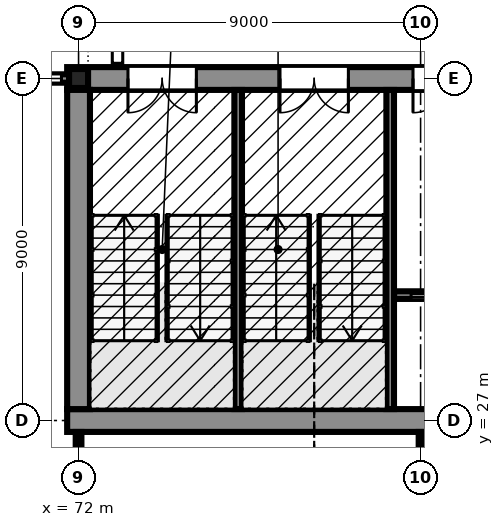
"""IFC4 building model, lengths in metres.
Left out: names, types, materials, properties, quantities, classifications, styles, units other than length and angle.
Written with IfcOpenShell. Run it as: python <this file> out.ifc"""

import sys

from ifc_helpers import new_model, si_unit, direction, frame, frame_2d, origin, origin_2d, place, context, subcontext, project, spatial, polyline, rectangle, hollow_rectangle, outline, extrude, element, fill, save


model = new_model("IFC4")
c1 = context("Model", 3, precision=1e-05, world=origin(), true_north=direction((0.0, 1.0)))
c2 = subcontext(c1, "Body", "Model", "MODEL_VIEW")
j1 = project(units=[si_unit("LENGTHUNIT", "METRE"), si_unit("PLANEANGLEUNIT", "RADIAN")], contexts=[c1])
p1 = place(None, origin())
s1 = spatial("IfcSite", under=j1, at=p1, CompositionType="ELEMENT")
p2 = place(p1, origin())
s2 = spatial("IfcBuilding", under=s1, at=p2, CompositionType="ELEMENT")
p3 = place(p2, frame((0.0, 0.0, 7.5)))
s3 = spatial("IfcBuildingStorey", under=s2, at=p3, CompositionType="ELEMENT", Elevation=7.5)
p4 = place(p3, frame((72.0, 36.0, 0.0), z_axis=(0.0, 0.0, 1.0), x_axis=(1.0, 0.0, 0.0)))
e1 = element("IfcColumn", 1, at=p4, inside=s3, PredefinedType="COLUMN", context=c2, shape_type="SweptSolid", body=[
    extrude(hollow_rectangle(XDim=0.5, YDim=0.5, WallThickness=0.032, at=origin_2d()), origin(), (0.0, 0.0, 1.0), 4.2),
])
p5 = place(p3, frame((71.7, 27.0, 0.0), z_axis=(0.0, 0.0, 1.0), x_axis=(1.0, 0.0, 0.0)))
e2 = element("IfcWall", 2, at=p5, inside=s3, PredefinedType="SOLIDWALL", context=c2, shape_type="SweptSolid", body=[
    extrude(rectangle(XDim=18.6, YDim=0.6, at=frame_2d((9.3, 0.0))), origin(), (0.0, 0.0, 1.0), 4.2),
])
p6 = place(p3, frame((71.7, 36.0, 0.0), z_axis=(0.0, 0.0, 1.0), x_axis=(1.0, 0.0, 0.0)))
e3 = element("IfcWall", 3, at=p6, inside=s3, PredefinedType="SOLIDWALL", context=c2, shape_type="SweptSolid", body=[
    extrude(rectangle(XDim=18.6, YDim=0.6, at=frame_2d((9.3, 0.0))), origin(), (0.0, 0.0, 1.0), 4.2),
])
p7 = place(p6, frame((1.6, 0.0, 0.0)))
e4 = element("IfcOpeningElement", 4, at=p7, cuts=e3, PredefinedType="OPENING", context=c2, shape_type="SweptSolid", body=[
    extrude(rectangle(XDim=1.8, YDim=2.1, at=frame_2d((0.9, 1.05))), frame((0.0, 0.31, 0.0), z_axis=(0.0, -1.0, 0.0), x_axis=(1.0, 0.0, 0.0)), (0.0, 0.0, 1.0), 0.62),
])
p8 = place(p6, frame((5.6, 0.0, 0.0)))
e5 = element("IfcOpeningElement", 5, at=p8, cuts=e3, PredefinedType="OPENING", context=c2, shape_type="SweptSolid", body=[
    extrude(rectangle(XDim=1.8, YDim=2.1, at=frame_2d((0.9, 1.05))), frame((0.0, 0.31, 0.0), z_axis=(0.0, -1.0, 0.0), x_axis=(1.0, 0.0, 0.0)), (0.0, 0.0, 1.0), 0.62),
])
p9 = place(p6, frame((9.1, 0.0, 0.0)))
e6 = element("IfcOpeningElement", 6, at=p9, cuts=e3, PredefinedType="OPENING", context=c2, shape_type="SweptSolid", body=[
    extrude(rectangle(XDim=1.8, YDim=2.1, at=frame_2d((0.9, 1.05))), frame((0.0, 0.31, 0.0), z_axis=(0.0, -1.0, 0.0), x_axis=(1.0, 0.0, 0.0)), (0.0, 0.0, 1.0), 0.62),
])
p10 = place(p3, frame((72.0, 27.3, 0.0), z_axis=(0.0, 0.0, 1.0), x_axis=(0.0, 1.0, 0.0)))
e7 = element("IfcWall", 7, at=p10, inside=s3, PredefinedType="SOLIDWALL", context=c2, shape_type="SweptSolid", body=[
    extrude(rectangle(XDim=8.4, YDim=0.6, at=frame_2d((4.2, 0.0))), origin(), (0.0, 0.0, 1.0), 4.2),
])
p11 = place(p3, frame((63.128, 36.0, 0.0), z_axis=(0.0, 0.0, 1.0), x_axis=(1.0, 0.0, 0.0)))
e8 = element("IfcWall", 8, at=p11, inside=s3, PredefinedType="SOLIDWALL", context=c2, shape_type="SweptSolid", body=[
    extrude(rectangle(XDim=8.622, YDim=0.22, at=frame_2d((4.311, 0.0))), origin(), (0.0, 0.0, 1.0), 3.597),
])
p12 = place(p11, frame((0.322, 0.0, 0.9)))
e9 = element("IfcOpeningElement", 9, at=p12, cuts=e8, PredefinedType="OPENING", context=c2, shape_type="SweptSolid", body=[
    extrude(rectangle(XDim=2.1, YDim=2.1, at=frame_2d((1.05, 1.05))), frame((0.0, 0.12, 0.0), z_axis=(0.0, -1.0, 0.0), x_axis=(1.0, 0.0, 0.0)), (0.0, 0.0, 1.0), 0.24),
])
p13 = place(p11, frame((3.322, 0.0, 0.9)))
e10 = element("IfcOpeningElement", 10, at=p13, cuts=e8, PredefinedType="OPENING", context=c2, shape_type="SweptSolid", body=[
    extrude(rectangle(XDim=2.1, YDim=2.1, at=frame_2d((1.05, 1.05))), frame((0.0, 0.12, 0.0), z_axis=(0.0, -1.0, 0.0), x_axis=(1.0, 0.0, 0.0)), (0.0, 0.0, 1.0), 0.24),
])
p14 = place(p11, frame((6.322, 0.0, 0.9)))
e11 = element("IfcOpeningElement", 11, at=p14, cuts=e8, PredefinedType="OPENING", context=c2, shape_type="SweptSolid", body=[
    extrude(rectangle(XDim=2.1, YDim=2.1, at=frame_2d((1.05, 1.05))), frame((0.0, 0.12, 0.0), z_axis=(0.0, -1.0, 0.0), x_axis=(1.0, 0.0, 0.0)), (0.0, 0.0, 1.0), 0.24),
])
for number, where, z_axis, x_axis in (
    (12, (76.2, 27.302, -0.13), (0.0, 0.0, 1.0), (0.0, 1.0, 0.0)),
    (13, (80.2, 27.302, -0.13), (0.0, 0.0, 1.0), (0.0, 1.0, 0.0)),
):
    element("IfcWall", number, at=place(p3, frame(where, z_axis=z_axis, x_axis=x_axis)), inside=s3, PredefinedType="SOLIDWALL", context=c2, shape_type="SweptSolid", body=[
        extrude(rectangle(XDim=8.396, YDim=0.2, at=frame_2d((4.198, 0.0))), origin(), (0.0, 0.0, 1.0), 3.646),
    ])
p15 = place(p3, frame((80.302, 30.3, 0.0), z_axis=(0.0, 0.0, 1.0), x_axis=(1.0, 0.0, 0.0)))
e14 = element("IfcWall", 14, at=p15, inside=s3, PredefinedType="SOLIDWALL", context=c2, shape_type="SweptSolid", body=[
    extrude(rectangle(XDim=2.198, YDim=0.2, at=frame_2d((1.099, 0.0))), origin(), (0.0, 0.0, 1.0), 3.516),
])
p16 = place(p15, frame((0.448, 0.0, 0.0)))
e15 = element("IfcOpeningElement", 15, at=p16, cuts=e14, PredefinedType="OPENING", context=c2, shape_type="SweptSolid", body=[
    extrude(rectangle(XDim=1.1, YDim=2.1, at=frame_2d((0.55, 1.05))), frame((0.0, 0.11, 0.0), z_axis=(0.0, -1.0, 0.0), x_axis=(1.0, 0.0, 0.0)), (0.0, 0.0, 1.0), 0.22),
])
p17 = place(p3, frame((72.0, 26.698, 0.0), z_axis=(0.0, 0.0, 1.0), x_axis=(0.0, -1.0, 0.0)))
e16 = element("IfcWall", 16, at=p17, inside=s3, PredefinedType="PARTITIONING", context=c2, shape_type="SweptSolid", body=[
    extrude(rectangle(XDim=5.635, YDim=0.15, at=frame_2d((2.818, 0.0))), origin(), (0.0, 0.0, 1.0), 3.307),
])
p18 = place(p3, frame((81.0, 26.698, 0.0), z_axis=(0.0, 0.0, 1.0), x_axis=(0.0, -1.0, 0.0)))
e17 = element("IfcWall", 17, at=p18, inside=s3, PredefinedType="PARTITIONING", context=c2, shape_type="SweptSolid", body=[
    extrude(rectangle(XDim=5.635, YDim=0.1, at=frame_2d((2.818, 0.0))), origin(), (0.0, 0.0, 1.0), 3.643),
])
p19 = place(p14, origin())
e18 = element("IfcWindow", 18, at=p19, inside=s3, PartitioningType="DOUBLE_PANEL_VERTICAL", PredefinedType="WINDOW", context=c2, shape_type="SweptSolid", body=[
    extrude(outline(polyline([(0.0, 0.0), (2.1, 0.0), (2.1, 2.1), (0.0, 2.1), (0.0, 0.0)]), holes=[polyline([(0.07, 0.07), (2.03, 0.07), (2.03, 2.03), (0.07, 2.03), (0.07, 0.07)])]), frame((0.0, 0.03, 0.0), z_axis=(0.0, -1.0, 0.0), x_axis=(1.0, 0.0, 0.0)), (0.0, 0.0, 1.0), 0.06),
    extrude(rectangle(XDim=0.04, YDim=1.96, at=frame_2d((1.05, 1.05))), frame((0.0, 0.022, 0.0), z_axis=(0.0, -1.0, 0.0), x_axis=(1.0, 0.0, 0.0)), (0.0, 0.0, 1.0), 0.044),
    extrude(outline(polyline([(0.07, 0.07), (1.03, 0.07), (1.03, 2.03), (0.07, 2.03), (0.07, 0.07)]), holes=[polyline([(0.1, 0.1), (1.0, 0.1), (1.0, 2.0), (0.1, 2.0), (0.1, 0.1)])]), frame((0.0, 0.022, 0.0), z_axis=(0.0, -1.0, 0.0), x_axis=(1.0, 0.0, 0.0)), (0.0, 0.0, 1.0), 0.045),
    extrude(rectangle(XDim=0.9, YDim=1.9, at=frame_2d((0.55, 1.05))), frame((0.0, 0.006, 0.0), z_axis=(0.0, -1.0, 0.0), x_axis=(1.0, 0.0, 0.0)), (0.0, 0.0, 1.0), 0.012),
    extrude(outline(polyline([(1.07, 0.07), (2.03, 0.07), (2.03, 2.03), (1.07, 2.03), (1.07, 0.07)]), holes=[polyline([(1.1, 0.1), (2.0, 0.1), (2.0, 2.0), (1.1, 2.0), (1.1, 0.1)])]), frame((0.0, 0.022, 0.0), z_axis=(0.0, -1.0, 0.0), x_axis=(1.0, 0.0, 0.0)), (0.0, 0.0, 1.0), 0.045),
    extrude(rectangle(XDim=0.9, YDim=1.9, at=frame_2d((1.55, 1.05))), frame((0.0, 0.006, 0.0), z_axis=(0.0, -1.0, 0.0), x_axis=(1.0, 0.0, 0.0)), (0.0, 0.0, 1.0), 0.012),
])
fill(e11, e18)
p20 = place(p16, origin())
e19 = element("IfcDoor", 19, at=p20, inside=s3, OperationType="SLIDING_TO_LEFT", PredefinedType="DOOR", context=c2, shape_type="SweptSolid", body=[
    extrude(outline(polyline([(0.0, 0.0), (0.07, 0.0), (0.07, 2.03), (1.03, 2.03), (1.03, 0.0), (1.1, 0.0), (1.1, 2.1), (0.0, 2.1), (0.0, 0.0)])), frame((0.0, 0.025, 0.0), z_axis=(0.0, -1.0, 0.0), x_axis=(1.0, 0.0, 0.0)), (0.0, 0.0, 1.0), 0.05),
    extrude(rectangle(XDim=0.524, YDim=2.016, at=frame_2d((0.336, 1.018))), frame((0.0, 0.018, 0.0), z_axis=(0.0, -1.0, 0.0), x_axis=(1.0, 0.0, 0.0)), (0.0, 0.0, 1.0), 0.016),
    extrude(rectangle(XDim=0.52, YDim=2.016, at=frame_2d((0.766, 1.018))), frame((0.0, -0.002, 0.0), z_axis=(0.0, -1.0, 0.0), x_axis=(1.0, 0.0, 0.0)), (0.0, 0.0, 1.0), 0.016),
])
fill(e15, e19)
p21 = place(p7, frame((1.8, 0.0, 0.0), z_axis=(0.0, 0.0, 1.0), x_axis=(-1.0, 0.0, 0.0)))
e20 = element("IfcDoor", 20, at=p21, inside=s3, OperationType="DOUBLE_DOOR_SINGLE_SWING", PredefinedType="DOOR", context=c2, shape_type="SweptSolid", body=[
    extrude(outline(polyline([(0.0, 0.0), (0.07, 0.0), (0.07, 2.03), (1.73, 2.03), (1.73, 0.0), (1.8, 0.0), (1.8, 2.1), (0.0, 2.1), (0.0, 0.0)])), frame((0.0, 0.025, 0.0), z_axis=(0.0, -1.0, 0.0), x_axis=(1.0, 0.0, 0.0)), (0.0, 0.0, 1.0), 0.05),
    extrude(outline(polyline([(0.074, 0.01), (0.897, 0.01), (0.897, 2.026), (0.074, 2.026), (0.074, 0.01)]), holes=[polyline([(0.194, 0.16), (0.777, 0.16), (0.777, 1.01), (0.194, 1.01), (0.194, 0.16)]), polyline([(0.335, 1.16), (0.635, 1.16), (0.635, 1.76), (0.335, 1.76), (0.335, 1.16)])]), frame((0.0, 0.017, 0.0), z_axis=(0.0, -1.0, 0.0), x_axis=(1.0, 0.0, 0.0)), (0.0, 0.0, 1.0), 0.035),
    extrude(rectangle(XDim=0.583, YDim=0.85, at=frame_2d((0.485, 0.585))), frame((0.0, 0.009, 0.0), z_axis=(0.0, -1.0, 0.0), x_axis=(1.0, 0.0, 0.0)), (0.0, 0.0, 1.0), 0.017),
    extrude(rectangle(XDim=0.3, YDim=0.6, at=frame_2d((0.485, 1.46))), frame((0.0, 0.006, 0.0), z_axis=(0.0, -1.0, 0.0), x_axis=(1.0, 0.0, 0.0)), (0.0, 0.0, 1.0), 0.012),
    extrude(outline(polyline([(0.903, 0.01), (1.726, 0.01), (1.726, 2.026), (0.903, 2.026), (0.903, 0.01)]), holes=[polyline([(1.023, 0.16), (1.606, 0.16), (1.606, 1.01), (1.023, 1.01), (1.023, 0.16)]), polyline([(1.165, 1.16), (1.465, 1.16), (1.465, 1.76), (1.165, 1.76), (1.165, 1.16)])]), frame((0.0, 0.017, 0.0), z_axis=(0.0, -1.0, 0.0), x_axis=(1.0, 0.0, 0.0)), (0.0, 0.0, 1.0), 0.035),
    extrude(rectangle(XDim=0.583, YDim=0.85, at=frame_2d((1.314, 0.585))), frame((0.0, 0.009, 0.0), z_axis=(0.0, -1.0, 0.0), x_axis=(1.0, 0.0, 0.0)), (0.0, 0.0, 1.0), 0.017),
    extrude(rectangle(XDim=0.3, YDim=0.6, at=frame_2d((1.314, 1.46))), frame((0.0, 0.006, 0.0), z_axis=(0.0, -1.0, 0.0), x_axis=(1.0, 0.0, 0.0)), (0.0, 0.0, 1.0), 0.012),
])
fill(e4, e20)
p22 = place(p8, frame((1.8, 0.0, 0.0), z_axis=(0.0, 0.0, 1.0), x_axis=(-1.0, 0.0, 0.0)))
e21 = element("IfcDoor", 21, at=p22, inside=s3, OperationType="DOUBLE_DOOR_SINGLE_SWING", PredefinedType="DOOR", context=c2, shape_type="SweptSolid", body=[
    extrude(outline(polyline([(0.0, 0.0), (0.07, 0.0), (0.07, 2.03), (1.73, 2.03), (1.73, 0.0), (1.8, 0.0), (1.8, 2.1), (0.0, 2.1), (0.0, 0.0)])), frame((0.0, 0.025, 0.0), z_axis=(0.0, -1.0, 0.0), x_axis=(1.0, 0.0, 0.0)), (0.0, 0.0, 1.0), 0.05),
    extrude(outline(polyline([(0.074, 0.01), (0.897, 0.01), (0.897, 2.026), (0.074, 2.026), (0.074, 0.01)]), holes=[polyline([(0.194, 0.16), (0.777, 0.16), (0.777, 1.01), (0.194, 1.01), (0.194, 0.16)]), polyline([(0.335, 1.16), (0.635, 1.16), (0.635, 1.76), (0.335, 1.76), (0.335, 1.16)])]), frame((0.0, 0.017, 0.0), z_axis=(0.0, -1.0, 0.0), x_axis=(1.0, 0.0, 0.0)), (0.0, 0.0, 1.0), 0.035),
    extrude(rectangle(XDim=0.583, YDim=0.85, at=frame_2d((0.485, 0.585))), frame((0.0, 0.009, 0.0), z_axis=(0.0, -1.0, 0.0), x_axis=(1.0, 0.0, 0.0)), (0.0, 0.0, 1.0), 0.017),
    extrude(rectangle(XDim=0.3, YDim=0.6, at=frame_2d((0.485, 1.46))), frame((0.0, 0.006, 0.0), z_axis=(0.0, -1.0, 0.0), x_axis=(1.0, 0.0, 0.0)), (0.0, 0.0, 1.0), 0.012),
    extrude(outline(polyline([(0.903, 0.01), (1.726, 0.01), (1.726, 2.026), (0.903, 2.026), (0.903, 0.01)]), holes=[polyline([(1.023, 0.16), (1.606, 0.16), (1.606, 1.01), (1.023, 1.01), (1.023, 0.16)]), polyline([(1.165, 1.16), (1.465, 1.16), (1.465, 1.76), (1.165, 1.76), (1.165, 1.16)])]), frame((0.0, 0.017, 0.0), z_axis=(0.0, -1.0, 0.0), x_axis=(1.0, 0.0, 0.0)), (0.0, 0.0, 1.0), 0.035),
    extrude(rectangle(XDim=0.583, YDim=0.85, at=frame_2d((1.314, 0.585))), frame((0.0, 0.009, 0.0), z_axis=(0.0, -1.0, 0.0), x_axis=(1.0, 0.0, 0.0)), (0.0, 0.0, 1.0), 0.017),
    extrude(rectangle(XDim=0.3, YDim=0.6, at=frame_2d((1.314, 1.46))), frame((0.0, 0.006, 0.0), z_axis=(0.0, -1.0, 0.0), x_axis=(1.0, 0.0, 0.0)), (0.0, 0.0, 1.0), 0.012),
])
fill(e5, e21)
p23 = place(p9, frame((1.8, 0.0, 0.0), z_axis=(0.0, 0.0, 1.0), x_axis=(-1.0, 0.0, 0.0)))
e22 = element("IfcDoor", 22, at=p23, inside=s3, OperationType="DOUBLE_DOOR_SINGLE_SWING", PredefinedType="DOOR", context=c2, shape_type="SweptSolid", body=[
    extrude(outline(polyline([(0.0, 0.0), (0.07, 0.0), (0.07, 2.03), (1.73, 2.03), (1.73, 0.0), (1.8, 0.0), (1.8, 2.1), (0.0, 2.1), (0.0, 0.0)])), frame((0.0, 0.025, 0.0), z_axis=(0.0, -1.0, 0.0), x_axis=(1.0, 0.0, 0.0)), (0.0, 0.0, 1.0), 0.05),
    extrude(outline(polyline([(0.074, 0.01), (0.897, 0.01), (0.897, 2.026), (0.074, 2.026), (0.074, 0.01)]), holes=[polyline([(0.194, 0.16), (0.777, 0.16), (0.777, 1.01), (0.194, 1.01), (0.194, 0.16)]), polyline([(0.335, 1.16), (0.635, 1.16), (0.635, 1.76), (0.335, 1.76), (0.335, 1.16)])]), frame((0.0, 0.017, 0.0), z_axis=(0.0, -1.0, 0.0), x_axis=(1.0, 0.0, 0.0)), (0.0, 0.0, 1.0), 0.035),
    extrude(rectangle(XDim=0.583, YDim=0.85, at=frame_2d((0.485, 0.585))), frame((0.0, 0.009, 0.0), z_axis=(0.0, -1.0, 0.0), x_axis=(1.0, 0.0, 0.0)), (0.0, 0.0, 1.0), 0.017),
    extrude(rectangle(XDim=0.3, YDim=0.6, at=frame_2d((0.485, 1.46))), frame((0.0, 0.006, 0.0), z_axis=(0.0, -1.0, 0.0), x_axis=(1.0, 0.0, 0.0)), (0.0, 0.0, 1.0), 0.012),
    extrude(outline(polyline([(0.903, 0.01), (1.726, 0.01), (1.726, 2.026), (0.903, 2.026), (0.903, 0.01)]), holes=[polyline([(1.023, 0.16), (1.606, 0.16), (1.606, 1.01), (1.023, 1.01), (1.023, 0.16)]), polyline([(1.165, 1.16), (1.465, 1.16), (1.465, 1.76), (1.165, 1.76), (1.165, 1.16)])]), frame((0.0, 0.017, 0.0), z_axis=(0.0, -1.0, 0.0), x_axis=(1.0, 0.0, 0.0)), (0.0, 0.0, 1.0), 0.035),
    extrude(rectangle(XDim=0.583, YDim=0.85, at=frame_2d((1.314, 0.585))), frame((0.0, 0.009, 0.0), z_axis=(0.0, -1.0, 0.0), x_axis=(1.0, 0.0, 0.0)), (0.0, 0.0, 1.0), 0.017),
    extrude(rectangle(XDim=0.3, YDim=0.6, at=frame_2d((1.314, 1.46))), frame((0.0, 0.006, 0.0), z_axis=(0.0, -1.0, 0.0), x_axis=(1.0, 0.0, 0.0)), (0.0, 0.0, 1.0), 0.012),
])
fill(e6, e22)
save(model, sys.argv[1])
